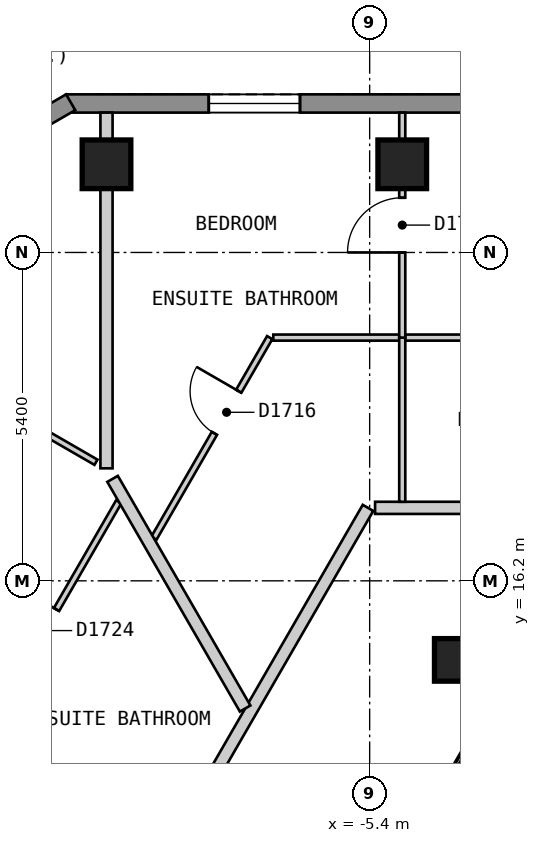
"""IFC4 building model, lengths in metres.
Left out: names, types, materials, properties, quantities, classifications, styles, units other than length and angle.
Written with IfcOpenShell. Run it as: python <this file> out.ifc"""

import sys

from ifc_helpers import new_model, si_unit, direction, frame, frame_2d, origin, origin_2d, place, context, subcontext, project, spatial, polyline, rectangle, outline, extrude, element, fill, save


model = new_model("IFC4")
c1 = context("Model", 3, precision=1e-05, world=origin(), true_north=direction((0.0, 1.0)))
c2 = subcontext(c1, "Body", "Model", "MODEL_VIEW")
j1 = project(units=[si_unit("LENGTHUNIT", "METRE"), si_unit("PLANEANGLEUNIT", "RADIAN")], contexts=[c1])
p1 = place(None, origin())
s1 = spatial("IfcSite", under=j1, at=p1, CompositionType="ELEMENT")
p2 = place(p1, origin())
s2 = spatial("IfcBuilding", under=s1, at=p2, CompositionType="ELEMENT")
p3 = place(p2, frame((0.0, 0.0, 187.2)))
s3 = spatial("IfcBuildingStorey", under=s2, at=p3, CompositionType="ELEMENT", Elevation=187.2)
for number, where, z_axis, x_axis in (
    (1, (-4.864, 23.05, 0.0), (0.0, 0.0, 1.0), (-1.0, 0.0, 0.0)),
    (2, (-9.728, 23.05, 0.0), (0.0, 0.0, 1.0), (-1.0, 0.0, 0.0)),
):
    element("IfcColumn", number, at=place(p3, frame(where, z_axis=z_axis, x_axis=x_axis)), inside=s3, PredefinedType="COLUMN", context=c2, shape_type="SweptSolid", body=[
        extrude(rectangle(XDim=0.8, YDim=0.8, at=origin_2d()), origin(), (0.0, 0.0, 1.0), 3.0),
    ])
p4 = place(p3, frame((-3.984, 14.9, 0.0), z_axis=(0.0, 0.0, 1.0), x_axis=(1.0, 0.0, 0.0)))
e3 = element("IfcColumn", 3, at=p4, inside=s3, PredefinedType="COLUMN", context=c2, shape_type="SweptSolid", body=[
    extrude(rectangle(XDim=0.7, YDim=0.7, at=origin_2d()), origin(), (0.0, 0.0, 1.0), 3.0),
])
p5 = place(p3, frame((10.392, 24.05, 0.0), z_axis=(0.0, 0.0, 1.0), x_axis=(-1.0, 0.0, 0.0)))
e4 = element("IfcWall", 4, at=p5, inside=s3, PredefinedType="SOLIDWALL", context=c2, shape_type="SweptSolid", body=[
    extrude(outline(polyline([(0.0, -0.15), (20.784, -0.15), (20.704, 0.15), (0.08, 0.15), (0.0, -0.15)])), origin(), (0.0, 0.0, 1.0), 2.7),
])
p6 = place(p5, frame((2.346, 0.0, 0.15)))
e5 = element("IfcOpeningElement", 5, at=p6, cuts=e4, PredefinedType="OPENING", context=c2, shape_type="SweptSolid", body=[
    extrude(rectangle(XDim=1.5, YDim=2.1, at=frame_2d((0.75, 1.05))), frame((0.0, 0.16, 0.0), z_axis=(0.0, -1.0, 0.0), x_axis=(1.0, 0.0, 0.0)), (0.0, 0.0, 1.0), 0.32),
])
p7 = place(p5, frame((7.21, 0.0, 0.15)))
e6 = element("IfcOpeningElement", 6, at=p7, cuts=e4, PredefinedType="OPENING", context=c2, shape_type="SweptSolid", body=[
    extrude(rectangle(XDim=1.5, YDim=2.1, at=frame_2d((0.75, 1.05))), frame((0.0, 0.16, 0.0), z_axis=(0.0, -1.0, 0.0), x_axis=(1.0, 0.0, 0.0)), (0.0, 0.0, 1.0), 0.32),
])
p8 = place(p5, frame((12.074, 0.0, 0.15)))
e7 = element("IfcOpeningElement", 7, at=p8, cuts=e4, PredefinedType="OPENING", context=c2, shape_type="SweptSolid", body=[
    extrude(rectangle(XDim=1.5, YDim=2.1, at=frame_2d((0.75, 1.05))), frame((0.0, 0.16, 0.0), z_axis=(0.0, -1.0, 0.0), x_axis=(1.0, 0.0, 0.0)), (0.0, 0.0, 1.0), 0.32),
])
p9 = place(p5, frame((16.938, 0.0, 0.15)))
e8 = element("IfcOpeningElement", 8, at=p9, cuts=e4, PredefinedType="OPENING", context=c2, shape_type="SweptSolid", body=[
    extrude(rectangle(XDim=1.5, YDim=2.1, at=frame_2d((0.75, 1.05))), frame((0.0, 0.16, 0.0), z_axis=(0.0, -1.0, 0.0), x_axis=(1.0, 0.0, 0.0)), (0.0, 0.0, 1.0), 0.32),
])
p10 = place(p3, frame((-10.317, 24.07, 0.0), z_axis=(0.0, 0.0, 1.0), x_axis=(-0.866022959057, -0.500004234368, 0.0)))
e9 = element("IfcWall", 9, at=p10, inside=s3, PredefinedType="SOLIDWALL", context=c2, shape_type="SweptSolid", body=[
    extrude(outline(polyline([(0.0, -0.15), (5.0, -0.15), (4.92, 0.15), (0.08, 0.15), (0.0, -0.15)])), origin(), (0.0, 0.0, 1.0), 2.7),
])
p11 = place(p10, frame((0.65, 0.0, 0.15)))
e10 = element("IfcOpeningElement", 10, at=p11, cuts=e9, PredefinedType="OPENING", context=c2, shape_type="SweptSolid", body=[
    extrude(rectangle(XDim=1.2, YDim=2.1, at=frame_2d((0.6, 1.05))), frame((0.0, 0.16, 0.0), z_axis=(0.0, -1.0, 0.0), x_axis=(1.0, 0.0, 0.0)), (0.0, 0.0, 1.0), 0.32),
])
p12 = place(p3, frame((-5.311, 17.4, 0.0), z_axis=(0.0, 0.0, 1.0), x_axis=(1.0, 0.0, 0.0)))
e11 = element("IfcWall", 11, at=p12, inside=s3, PredefinedType="PARTITIONING", context=c2, shape_type="SweptSolid", body=[
    extrude(rectangle(XDim=10.737, YDim=0.2, at=frame_2d((5.369, 0.0))), origin(), (0.0, 0.0, 1.0), 2.7),
])
p13 = place(p12, frame((7.243, 0.0, 0.0)))
e12 = element("IfcOpeningElement", 12, at=p13, cuts=e11, PredefinedType="OPENING", context=c2, shape_type="SweptSolid", body=[
    extrude(rectangle(XDim=0.9, YDim=2.1, at=frame_2d((0.45, 1.05))), frame((0.0, 0.11, 0.0), z_axis=(0.0, -1.0, 0.0), x_axis=(1.0, 0.0, 0.0)), (0.0, 0.0, 1.0), 0.22),
])
p14 = place(p3, frame((-10.771, 8.145, 0.0), z_axis=(0.0, 0.0, 1.0), x_axis=(0.500048075867, 0.865997645391, 0.0)))
e13 = element("IfcWall", 13, at=p14, inside=s3, PredefinedType="PARTITIONING", context=c2, shape_type="SweptSolid", body=[
    extrude(rectangle(XDim=10.687, YDim=0.2, at=frame_2d((5.344, 0.0))), origin(), (0.0, 0.0, 1.0), 2.7),
])
p15 = place(p14, frame((0.549, 0.0, 0.0)))
e14 = element("IfcOpeningElement", 14, at=p15, cuts=e13, PredefinedType="OPENING", context=c2, shape_type="SweptSolid", body=[
    extrude(rectangle(XDim=1.0, YDim=2.1, at=frame_2d((0.5, 1.05))), frame((0.0, 0.11, 0.0), z_axis=(0.0, -1.0, 0.0), x_axis=(1.0, 0.0, 0.0)), (0.0, 0.0, 1.0), 0.22),
])
p16 = place(p3, frame((-14.794, 20.975, 0.0), z_axis=(0.0, 0.0, 1.0), x_axis=(0.866011447264, -0.500024172624, 0.0)))
e15 = element("IfcWall", 15, at=p16, inside=s3, PredefinedType="PARTITIONING", context=c2, shape_type="SweptSolid", body=[
    extrude(rectangle(XDim=5.65, YDim=0.1, at=frame_2d((2.825, 0.0))), origin(), (0.0, 0.0, 1.0), 2.7),
])
p17 = place(p16, frame((2.475, 0.0, 0.0)))
e16 = element("IfcOpeningElement", 16, at=p17, cuts=e15, PredefinedType="OPENING", context=c2, shape_type="SweptSolid", body=[
    extrude(rectangle(XDim=0.9, YDim=2.1, at=frame_2d((0.45, 1.05))), frame((0.0, 0.06, 0.0), z_axis=(0.0, -1.0, 0.0), x_axis=(1.0, 0.0, 0.0)), (0.0, 0.0, 1.0), 0.12),
])
p18 = place(p3, frame((-6.985, 20.2, 0.0), z_axis=(0.0, 0.0, 1.0), x_axis=(1.0, 0.0, 0.0)))
e17 = element("IfcWall", 17, at=p18, inside=s3, PredefinedType="PARTITIONING", context=c2, shape_type="SweptSolid", body=[
    extrude(rectangle(XDim=6.935, YDim=0.1, at=frame_2d((3.468, 0.0))), origin(), (0.0, 0.0, 1.0), 2.7),
])
p19 = place(p18, frame((4.153, 0.0, 0.0)))
e18 = element("IfcOpeningElement", 18, at=p19, cuts=e17, PredefinedType="OPENING", context=c2, shape_type="SweptSolid", body=[
    extrude(rectangle(XDim=0.8, YDim=2.1, at=frame_2d((0.4, 1.05))), frame((0.0, 0.06, 0.0), z_axis=(0.0, -1.0, 0.0), x_axis=(1.0, 0.0, 0.0)), (0.0, 0.0, 1.0), 0.12),
])
p20 = place(p3, frame((-8.949, 16.9, 0.0), z_axis=(0.0, 0.0, 1.0), x_axis=(0.499949850951, 0.866054355415, 0.0)))
e19 = element("IfcWall", 19, at=p20, inside=s3, PredefinedType="PARTITIONING", context=c2, shape_type="SweptSolid", body=[
    extrude(rectangle(XDim=3.811, YDim=0.1, at=frame_2d((1.905, 0.0))), origin(), (0.0, 0.0, 1.0), 2.7),
])
p21 = place(p20, frame((1.992, 0.0, 0.0)))
e20 = element("IfcOpeningElement", 20, at=p21, cuts=e19, PredefinedType="OPENING", context=c2, shape_type="SweptSolid", body=[
    extrude(rectangle(XDim=0.8, YDim=2.1, at=frame_2d((0.4, 1.05))), frame((0.0, 0.06, 0.0), z_axis=(0.0, -1.0, 0.0), x_axis=(1.0, 0.0, 0.0)), (0.0, 0.0, 1.0), 0.12),
])
p22 = place(p3, frame((-15.012, 8.0, 0.0), z_axis=(0.0, 0.0, 1.0), x_axis=(0.500047346826, 0.865998066356, 0.0)))
e21 = element("IfcWall", 21, at=p22, inside=s3, PredefinedType="PARTITIONING", context=c2, shape_type="SweptSolid", body=[
    extrude(rectangle(XDim=10.971, YDim=0.1, at=frame_2d((5.486, 0.0))), origin(), (0.0, 0.0, 1.0), 2.7),
])
p23 = place(p22, frame((2.791, 0.0, 0.0)))
e22 = element("IfcOpeningElement", 22, at=p23, cuts=e21, PredefinedType="OPENING", context=c2, shape_type="SweptSolid", body=[
    extrude(rectangle(XDim=0.9, YDim=2.1, at=frame_2d((0.45, 1.05))), frame((0.0, 0.06, 0.0), z_axis=(0.0, -1.0, 0.0), x_axis=(1.0, 0.0, 0.0)), (0.0, 0.0, 1.0), 0.12),
])
p24 = place(p22, frame((8.124, 0.0, 0.0)))
e23 = element("IfcOpeningElement", 23, at=p24, cuts=e21, PredefinedType="OPENING", context=c2, shape_type="SweptSolid", body=[
    extrude(rectangle(XDim=0.8, YDim=2.1, at=frame_2d((0.4, 1.05))), frame((0.0, 0.06, 0.0), z_axis=(0.0, -1.0, 0.0), x_axis=(1.0, 0.0, 0.0)), (0.0, 0.0, 1.0), 0.12),
])
p25 = place(p3, frame((-4.864, 17.5, 0.0), z_axis=(0.0, 0.0, 1.0), x_axis=(0.0, 1.0, 0.0)))
e24 = element("IfcWall", 24, at=p25, inside=s3, PredefinedType="PARTITIONING", context=c2, shape_type="SweptSolid", body=[
    extrude(rectangle(XDim=2.7, YDim=0.1, at=frame_2d((1.35, 0.0))), origin(), (0.0, 0.0, 1.0), 2.7),
])
p26 = place(p3, frame((-9.628, 17.877, 0.0), z_axis=(0.0, 0.0, 1.0), x_axis=(0.499890461358, -0.866088636713, 0.0)))
e25 = element("IfcWall", 25, at=p26, inside=s3, PredefinedType="PARTITIONING", context=c2, shape_type="SweptSolid", body=[
    extrude(rectangle(XDim=4.361, YDim=0.2, at=frame_2d((2.18, 0.0))), origin(), (0.0, 0.0, 1.0), 2.7),
])
p27 = place(p3, frame((-9.728, 18.05, 0.0), z_axis=(0.0, 0.0, 1.0), x_axis=(0.0, 1.0, 0.0)))
e26 = element("IfcWall", 26, at=p27, inside=s3, PredefinedType="PARTITIONING", context=c2, shape_type="SweptSolid", body=[
    extrude(rectangle(XDim=5.85, YDim=0.2, at=frame_2d((2.925, 0.0))), origin(), (0.0, 0.0, 1.0), 2.7),
])
p28 = place(p3, frame((-12.031, 13.163, 0.0), z_axis=(0.0, 0.0, 1.0), x_axis=(0.86608920467, -0.499889477339, 0.0)))
e27 = element("IfcWall", 27, at=p28, inside=s3, PredefinedType="PARTITIONING", context=c2, shape_type="SweptSolid", body=[
    extrude(rectangle(XDim=3.501, YDim=0.1, at=frame_2d((1.75, 0.0))), origin(), (0.0, 0.0, 1.0), 2.7),
])
p29 = place(p3, frame((-4.864, 20.2, 0.0), z_axis=(0.0, 0.0, 1.0), x_axis=(0.0, 1.0, 0.0)))
e28 = element("IfcWall", 28, at=p29, inside=s3, PredefinedType="PARTITIONING", context=c2, shape_type="SweptSolid", body=[
    extrude(rectangle(XDim=3.7, YDim=0.1, at=frame_2d((1.85, 0.0))), origin(), (0.0, 0.0, 1.0), 2.7),
])
p30 = place(p29, frame((1.4, 0.0, 0.0)))
e29 = element("IfcOpeningElement", 29, at=p30, cuts=e28, PredefinedType="OPENING", context=c2, shape_type="SweptSolid", body=[
    extrude(rectangle(XDim=0.9, YDim=2.1, at=frame_2d((0.45, 1.05))), frame((0.0, 0.06, 0.0), z_axis=(0.0, -1.0, 0.0), x_axis=(1.0, 0.0, 0.0)), (0.0, 0.0, 1.0), 0.12),
])
p31 = place(p9, origin())
e30 = element("IfcWindow", 30, at=p31, inside=s3, PartitioningType="SINGLE_PANEL", PredefinedType="WINDOW", context=c2, shape_type="SweptSolid", body=[
    extrude(rectangle(XDim=1.5, YDim=2.1, at=frame_2d((0.75, 1.05))), frame((0.0, 0.03, 0.0), z_axis=(0.0, -1.0, 0.0), x_axis=(1.0, 0.0, 0.0)), (0.0, 0.0, 1.0), 0.06),
])
fill(e8, e30)
p32 = place(p30, origin())
e31 = element("IfcDoor", 31, at=p32, inside=s3, OperationType="SINGLE_SWING_LEFT", PredefinedType="DOOR", context=c2, shape_type="SweptSolid", body=[
    extrude(rectangle(XDim=0.9, YDim=2.1, at=frame_2d((0.45, 1.05))), frame((0.0, 0.025, 0.0), z_axis=(0.0, -1.0, 0.0), x_axis=(1.0, 0.0, 0.0)), (0.0, 0.0, 1.0), 0.05),
])
fill(e29, e31)
p33 = place(p21, origin())
e32 = element("IfcDoor", 32, at=p33, inside=s3, OperationType="SINGLE_SWING_RIGHT", PredefinedType="DOOR", context=c2, shape_type="SweptSolid", body=[
    extrude(rectangle(XDim=0.8, YDim=2.1, at=frame_2d((0.4, 1.05))), frame((0.0, 0.025, 0.0), z_axis=(0.0, -1.0, 0.0), x_axis=(1.0, 0.0, 0.0)), (0.0, 0.0, 1.0), 0.05),
])
fill(e20, e32)
p34 = place(p24, origin())
e33 = element("IfcDoor", 33, at=p34, inside=s3, OperationType="SINGLE_SWING_RIGHT", PredefinedType="DOOR", context=c2, shape_type="SweptSolid", body=[
    extrude(rectangle(XDim=0.8, YDim=2.1, at=frame_2d((0.4, 1.05))), frame((0.0, 0.025, 0.0), z_axis=(0.0, -1.0, 0.0), x_axis=(1.0, 0.0, 0.0)), (0.0, 0.0, 1.0), 0.05),
])
fill(e23, e33)
save(model, sys.argv[1])
